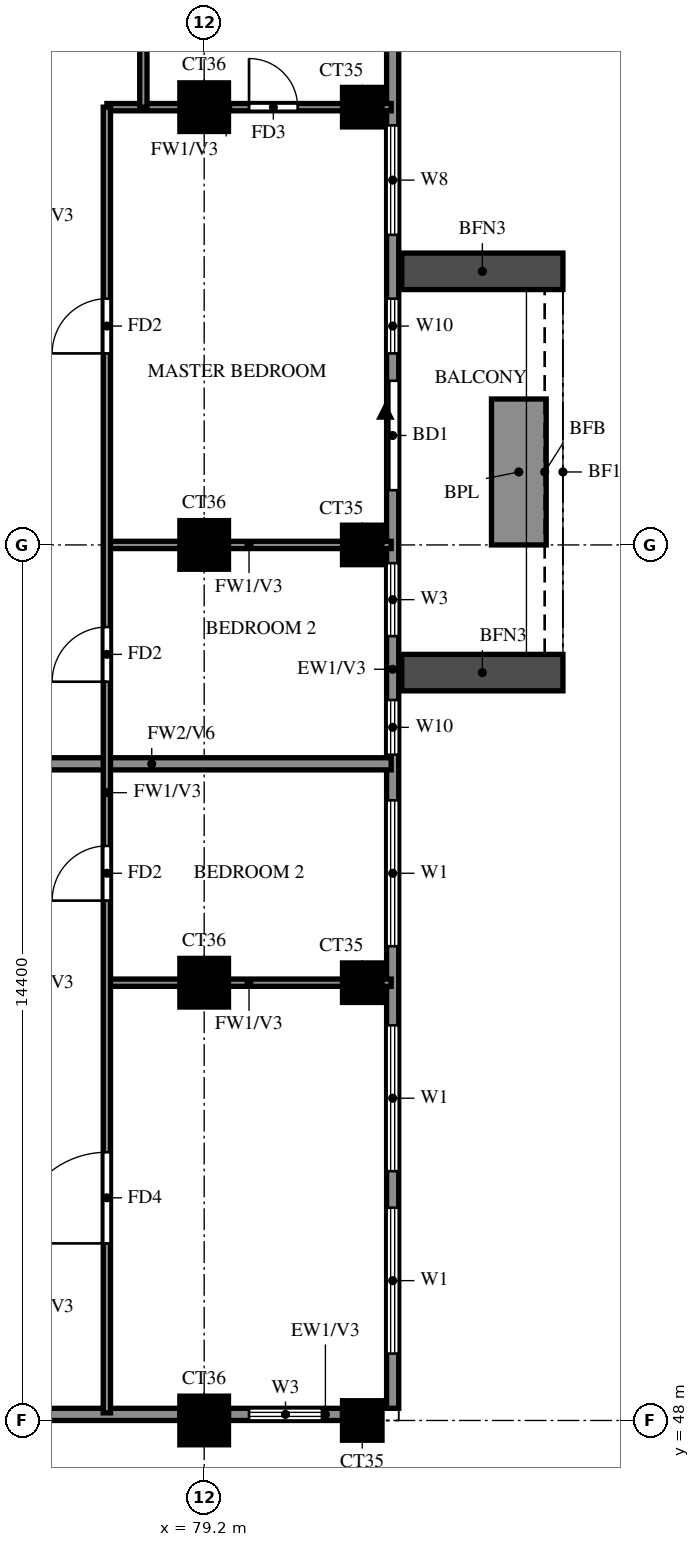
"""IFC4 building model, lengths in metres.
Left out: names, types, materials, properties, quantities, classifications, styles, units other than length and angle.
Written with IfcOpenShell. Run it as: python <this file> out.ifc"""

import sys

from ifc_helpers import new_model, si_unit, direction, frame, frame_2d, origin, origin_2d, place, context, subcontext, project, spatial, rectangle, extrude, source, transform, mapped, element, fill, save


model = new_model("IFC4")
c1 = context("Model", 3, precision=1e-05, world=origin(), true_north=direction((0.0, 1.0)))
c2 = subcontext(c1, "Body", "Model", "MODEL_VIEW")
j1 = project(units=[si_unit("LENGTHUNIT", "METRE"), si_unit("PLANEANGLEUNIT", "RADIAN")], contexts=[c1])
p1 = place(None, origin())
s1 = spatial("IfcSite", under=j1, at=p1, CompositionType="ELEMENT")
p2 = place(p1, origin())
s2 = spatial("IfcBuilding", under=s1, at=p2, CompositionType="ELEMENT")
p3 = place(p2, frame((0.0, 0.0, 246.5)))
s3 = spatial("IfcBuildingStorey", under=s2, at=p3, CompositionType="ELEMENT", Elevation=246.5)
m1 = source(origin(), c2, "Body", "SweptSolid", [
    extrude(rectangle(XDim=0.8, YDim=0.8, at=origin_2d()), origin(), (0.0, 0.0, 1.0), 3.22),
])
p4 = place(p3, frame((79.2, 48.0, 0.0), z_axis=(0.0, 0.0, 1.0), x_axis=(1.0, 0.0, 0.0)))
e1 = element("IfcColumn", 1, at=p4, inside=s3, PredefinedType="COLUMN", context=c2, shape_type="MappedRepresentation", body=[
    mapped(m1, transform((0.0, 0.0, 0.0))),
])
m2 = source(origin(), c2, "Body", "SweptSolid", [
    extrude(rectangle(XDim=0.65, YDim=0.65, at=origin_2d()), origin(), (0.0, 0.0, 1.0), 3.22),
])
p5 = place(p3, frame((81.8, 48.0, 0.0), z_axis=(0.0, 0.0, 1.0), x_axis=(1.0, 0.0, 0.0)))
e2 = element("IfcColumn", 2, at=p5, inside=s3, PredefinedType="COLUMN", context=c2, shape_type="MappedRepresentation", body=[
    mapped(m2, transform((0.0, 0.0, 0.0))),
])
p6 = place(p3, frame((79.2, 55.2, 0.0), z_axis=(0.0, 0.0, 1.0), x_axis=(1.0, 0.0, 0.0)))
e3 = element("IfcColumn", 3, at=p6, inside=s3, PredefinedType="COLUMN", context=c2, shape_type="MappedRepresentation", body=[
    mapped(m1, transform((0.0, 0.0, 0.0))),
])
p7 = place(p3, frame((81.8, 55.2, 0.0), z_axis=(0.0, 0.0, 1.0), x_axis=(1.0, 0.0, 0.0)))
e4 = element("IfcColumn", 4, at=p7, inside=s3, PredefinedType="COLUMN", context=c2, shape_type="MappedRepresentation", body=[
    mapped(m2, transform((0.0, 0.0, 0.0))),
])
p8 = place(p3, frame((79.2, 62.4, 0.0), z_axis=(0.0, 0.0, 1.0), x_axis=(1.0, 0.0, 0.0)))
e5 = element("IfcColumn", 5, at=p8, inside=s3, PredefinedType="COLUMN", context=c2, shape_type="MappedRepresentation", body=[
    mapped(m1, transform((0.0, 0.0, 0.0))),
])
p9 = place(p3, frame((81.8, 62.4, 0.0), z_axis=(0.0, 0.0, 1.0), x_axis=(1.0, 0.0, 0.0)))
e6 = element("IfcColumn", 6, at=p9, inside=s3, PredefinedType="COLUMN", context=c2, shape_type="MappedRepresentation", body=[
    mapped(m2, transform((0.0, 0.0, 0.0))),
])
p10 = place(p3, frame((79.2, 69.6, 0.0), z_axis=(0.0, 0.0, 1.0), x_axis=(1.0, 0.0, 0.0)))
e7 = element("IfcColumn", 7, at=p10, inside=s3, PredefinedType="COLUMN", context=c2, shape_type="MappedRepresentation", body=[
    mapped(m1, transform((0.0, 0.0, 0.0))),
])
p11 = place(p3, frame((81.8, 69.6, 0.0), z_axis=(0.0, 0.0, 1.0), x_axis=(1.0, 0.0, 0.0)))
e8 = element("IfcColumn", 8, at=p11, inside=s3, PredefinedType="COLUMN", context=c2, shape_type="MappedRepresentation", body=[
    mapped(m2, transform((0.0, 0.0, 0.0))),
])
p12 = place(p3, frame((81.907, 39.87, 0.0), z_axis=(0.0, 0.0, 1.0), x_axis=(-0.777936274417, 0.62834318087, 0.0)))
e9 = element("IfcWall", 9, at=p12, inside=s3, PredefinedType="SOLIDWALL", context=c2, shape_type="SweptSolid", body=[
    extrude(rectangle(XDim=13.099, YDim=0.2, at=frame_2d((6.549, 0.0))), origin(), (0.0, 0.0, 1.0), 3.22),
])
p13 = place(p12, frame((9.938, 0.0, 1.5)))
e10 = element("IfcOpeningElement", 10, at=p13, cuts=e9, PredefinedType="OPENING", context=c2, shape_type="SweptSolid", body=[
    extrude(rectangle(XDim=0.9, YDim=0.9, at=frame_2d((0.45, 0.45))), frame((0.0, 0.11, 0.0), z_axis=(0.0, -1.0, 0.0), x_axis=(1.0, 0.0, 0.0)), (0.0, 0.0, 1.0), 0.22),
])
p14 = place(p3, frame((71.987, 48.1, 0.0), z_axis=(0.0, 0.0, 1.0), x_axis=(1.0, 0.0, 0.0)))
e11 = element("IfcWall", 11, at=p14, inside=s3, PredefinedType="SOLIDWALL", context=c2, shape_type="SweptSolid", body=[
    extrude(rectangle(XDim=6.813, YDim=0.2, at=frame_2d((3.406, 0.0))), origin(), (0.0, 0.0, 1.0), 3.22),
])
p15 = place(p3, frame((79.6, 48.1, 0.0), z_axis=(0.0, 0.0, 1.0), x_axis=(1.0, 0.0, 0.0)))
e12 = element("IfcWall", 12, at=p15, inside=s3, PredefinedType="SOLIDWALL", context=c2, shape_type="SweptSolid", body=[
    extrude(rectangle(XDim=1.875, YDim=0.2, at=frame_2d((0.938, 0.0))), origin(), (0.0, 0.0, 1.0), 3.22),
])
p16 = place(p15, frame((0.337, 0.0, 0.6)))
e13 = element("IfcOpeningElement", 13, at=p16, cuts=e12, PredefinedType="OPENING", context=c2, shape_type="SweptSolid", body=[
    extrude(rectangle(XDim=1.2, YDim=2.4, at=frame_2d((0.6, 1.2))), frame((0.0, 0.11, 0.0), z_axis=(0.0, -1.0, 0.0), x_axis=(1.0, 0.0, 0.0)), (0.0, 0.0, 1.0), 0.22),
])
p17 = place(p3, frame((82.3, 48.2, 0.0), z_axis=(0.0, 0.0, 1.0), x_axis=(0.0, 1.0, 0.0)))
e14 = element("IfcWall", 14, at=p17, inside=s3, PredefinedType="SOLIDWALL", context=c2, shape_type="SweptSolid", body=[
    extrude(rectangle(XDim=28.6, YDim=0.2, at=frame_2d((14.3, 0.0))), origin(), (0.0, 0.0, 1.0), 3.22),
])
p18 = place(p17, frame((15.1, 0.0, 0.0)))
e15 = element("IfcOpeningElement", 15, at=p18, cuts=e14, PredefinedType="OPENING", context=c2, shape_type="SweptSolid", body=[
    extrude(rectangle(XDim=1.8, YDim=2.4, at=frame_2d((0.9, 1.2))), frame((0.0, 0.11, 0.0), z_axis=(0.0, -1.0, 0.0), x_axis=(1.0, 0.0, 0.0)), (0.0, 0.0, 1.0), 0.22),
])
p19 = place(p17, frame((0.9, 0.0, 0.6)))
e16 = element("IfcOpeningElement", 16, at=p19, cuts=e14, PredefinedType="OPENING", context=c2, shape_type="SweptSolid", body=[
    extrude(rectangle(XDim=2.4, YDim=2.4, at=frame_2d((1.2, 1.2))), frame((0.0, 0.11, 0.0), z_axis=(0.0, -1.0, 0.0), x_axis=(1.0, 0.0, 0.0)), (0.0, 0.0, 1.0), 0.22),
])
p20 = place(p17, frame((3.9, 0.0, 0.6)))
e17 = element("IfcOpeningElement", 17, at=p20, cuts=e14, PredefinedType="OPENING", context=c2, shape_type="SweptSolid", body=[
    extrude(rectangle(XDim=2.4, YDim=2.4, at=frame_2d((1.2, 1.2))), frame((0.0, 0.11, 0.0), z_axis=(0.0, -1.0, 0.0), x_axis=(1.0, 0.0, 0.0)), (0.0, 0.0, 1.0), 0.22),
])
p21 = place(p17, frame((7.6, 0.0, 0.6)))
e18 = element("IfcOpeningElement", 18, at=p21, cuts=e14, PredefinedType="OPENING", context=c2, shape_type="SweptSolid", body=[
    extrude(rectangle(XDim=2.4, YDim=2.4, at=frame_2d((1.2, 1.2))), frame((0.0, 0.11, 0.0), z_axis=(0.0, -1.0, 0.0), x_axis=(1.0, 0.0, 0.0)), (0.0, 0.0, 1.0), 0.22),
])
p22 = place(p17, frame((10.75, 0.0, 0.6)))
e19 = element("IfcOpeningElement", 19, at=p22, cuts=e14, PredefinedType="OPENING", context=c2, shape_type="SweptSolid", body=[
    extrude(rectangle(XDim=0.9, YDim=2.4, at=frame_2d((0.45, 1.2))), frame((0.0, 0.11, 0.0), z_axis=(0.0, -1.0, 0.0), x_axis=(1.0, 0.0, 0.0)), (0.0, 0.0, 1.0), 0.22),
])
p23 = place(p17, frame((12.7, 0.0, 0.6)))
e20 = element("IfcOpeningElement", 20, at=p23, cuts=e14, PredefinedType="OPENING", context=c2, shape_type="SweptSolid", body=[
    extrude(rectangle(XDim=1.2, YDim=2.4, at=frame_2d((0.6, 1.2))), frame((0.0, 0.11, 0.0), z_axis=(0.0, -1.0, 0.0), x_axis=(1.0, 0.0, 0.0)), (0.0, 0.0, 1.0), 0.22),
])
p24 = place(p17, frame((17.35, 0.0, 0.6)))
e21 = element("IfcOpeningElement", 21, at=p24, cuts=e14, PredefinedType="OPENING", context=c2, shape_type="SweptSolid", body=[
    extrude(rectangle(XDim=0.9, YDim=2.4, at=frame_2d((0.45, 1.2))), frame((0.0, 0.11, 0.0), z_axis=(0.0, -1.0, 0.0), x_axis=(1.0, 0.0, 0.0)), (0.0, 0.0, 1.0), 0.22),
])
p25 = place(p17, frame((19.3, 0.0, 0.6)))
e22 = element("IfcOpeningElement", 22, at=p25, cuts=e14, PredefinedType="OPENING", context=c2, shape_type="SweptSolid", body=[
    extrude(rectangle(XDim=1.8, YDim=2.4, at=frame_2d((0.9, 1.2))), frame((0.0, 0.11, 0.0), z_axis=(0.0, -1.0, 0.0), x_axis=(1.0, 0.0, 0.0)), (0.0, 0.0, 1.0), 0.22),
])
p26 = place(p17, frame((22.75, 0.0, 1.5)))
e23 = element("IfcOpeningElement", 23, at=p26, cuts=e14, PredefinedType="OPENING", context=c2, shape_type="SweptSolid", body=[
    extrude(rectangle(XDim=0.9, YDim=0.9, at=frame_2d((0.45, 0.45))), frame((0.0, 0.11, 0.0), z_axis=(0.0, -1.0, 0.0), x_axis=(1.0, 0.0, 0.0)), (0.0, 0.0, 1.0), 0.22),
])
p27 = place(p17, frame((25.5, 0.0, 0.6)))
e24 = element("IfcOpeningElement", 24, at=p27, cuts=e14, PredefinedType="OPENING", context=c2, shape_type="SweptSolid", body=[
    extrude(rectangle(XDim=2.4, YDim=2.4, at=frame_2d((1.2, 1.2))), frame((0.0, 0.11, 0.0), z_axis=(0.0, -1.0, 0.0), x_axis=(1.0, 0.0, 0.0)), (0.0, 0.0, 1.0), 0.22),
])
for number, where, z_axis, x_axis in (
    (25, (82.45, 60.3, 0.0), (0.0, 0.0, 1.0), (1.0, 0.0, 0.0)),
    (26, (82.45, 66.9, 0.0), (0.0, 0.0, 1.0), (1.0, 0.0, 0.0)),
):
    element("IfcWall", number, at=place(p3, frame(where, z_axis=z_axis, x_axis=x_axis)), inside=s3, PredefinedType="SOLIDWALL", context=c2, shape_type="SweptSolid", body=[
        extrude(rectangle(XDim=2.65, YDim=0.6, at=frame_2d((1.325, 0.0))), origin(), (0.0, 0.0, 1.0), 2.85),
    ])
p28 = place(p3, frame((84.375, 62.4, 0.0), z_axis=(0.0, 0.0, 1.0), x_axis=(0.0, 1.0, 0.0)))
e27 = element("IfcWall", 27, at=p28, inside=s3, PredefinedType="SOLIDWALL", context=c2, shape_type="SweptSolid", body=[
    extrude(rectangle(XDim=2.4, YDim=0.9, at=frame_2d((1.2, 0.0))), origin(), (0.0, 0.0, 1.0), 0.9),
])
p29 = place(p3, frame((74.4, 58.8, 0.0), z_axis=(0.0, 0.0, 1.0), x_axis=(1.0, 0.0, 0.0)))
e28 = element("IfcWall", 28, at=p29, inside=s3, PredefinedType="SOLIDWALL", context=c2, shape_type="SweptSolid", body=[
    extrude(rectangle(XDim=7.875, YDim=0.2, at=frame_2d((3.938, 0.0))), origin(), (0.0, 0.0, 1.0), 2.32),
])
for number, where, z_axis, x_axis in (
    (29, (77.6, 55.2, 0.0), (0.0, 0.0, 1.0), (1.0, 0.0, 0.0)),
    (30, (77.6, 62.4, 0.0), (0.0, 0.0, 1.0), (1.0, 0.0, 0.0)),
):
    element("IfcWall", number, at=place(p3, frame(where, z_axis=z_axis, x_axis=x_axis)), inside=s3, PredefinedType="PARTITIONING", context=c2, shape_type="SweptSolid", body=[
        extrude(rectangle(XDim=4.675, YDim=0.12, at=frame_2d((2.337, 0.0))), origin(), (0.0, 0.0, 1.0), 3.22),
    ])
p30 = place(p3, frame((77.6, 69.6, 0.0), z_axis=(0.0, 0.0, 1.0), x_axis=(1.0, 0.0, 0.0)))
e31 = element("IfcWall", 31, at=p30, inside=s3, PredefinedType="PARTITIONING", context=c2, shape_type="SweptSolid", body=[
    extrude(rectangle(XDim=4.675, YDim=0.12, at=frame_2d((2.337, 0.0))), origin(), (0.0, 0.0, 1.0), 3.22),
])
p31 = place(p30, frame((2.337, 0.0, 0.0)))
e32 = element("IfcOpeningElement", 32, at=p31, cuts=e31, PredefinedType="OPENING", context=c2, shape_type="SweptSolid", body=[
    extrude(rectangle(XDim=0.8, YDim=2.1, at=frame_2d((0.4, 1.05))), frame((0.0, 0.07, 0.0), z_axis=(0.0, -1.0, 0.0), x_axis=(1.0, 0.0, 0.0)), (0.0, 0.0, 1.0), 0.14),
])
p32 = place(p3, frame((77.6, 48.125, 0.0), z_axis=(0.0, 0.0, 1.0), x_axis=(0.0, 1.0, 0.0)))
e33 = element("IfcWall", 33, at=p32, inside=s3, PredefinedType="PARTITIONING", context=c2, shape_type="SweptSolid", body=[
    extrude(rectangle(XDim=21.475, YDim=0.12, at=frame_2d((10.738, 0.0))), origin(), (0.0, 0.0, 1.0), 3.22),
])
p33 = place(p32, frame((2.788, 0.0, 0.0)))
e34 = element("IfcOpeningElement", 34, at=p33, cuts=e33, PredefinedType="OPENING", context=c2, shape_type="SweptSolid", body=[
    extrude(rectangle(XDim=1.5, YDim=2.1, at=frame_2d((0.75, 1.05))), frame((0.0, 0.07, 0.0), z_axis=(0.0, -1.0, 0.0), x_axis=(1.0, 0.0, 0.0)), (0.0, 0.0, 1.0), 0.14),
])
p34 = place(p32, frame((8.425, 0.0, 0.0)))
e35 = element("IfcOpeningElement", 35, at=p34, cuts=e33, PredefinedType="OPENING", context=c2, shape_type="SweptSolid", body=[
    extrude(rectangle(XDim=0.9, YDim=2.1, at=frame_2d((0.45, 1.05))), frame((0.0, 0.07, 0.0), z_axis=(0.0, -1.0, 0.0), x_axis=(1.0, 0.0, 0.0)), (0.0, 0.0, 1.0), 0.14),
])
p35 = place(p32, frame((12.025, 0.0, 0.0)))
e36 = element("IfcOpeningElement", 36, at=p35, cuts=e33, PredefinedType="OPENING", context=c2, shape_type="SweptSolid", body=[
    extrude(rectangle(XDim=0.9, YDim=2.1, at=frame_2d((0.45, 1.05))), frame((0.0, 0.07, 0.0), z_axis=(0.0, -1.0, 0.0), x_axis=(1.0, 0.0, 0.0)), (0.0, 0.0, 1.0), 0.14),
])
p36 = place(p32, frame((17.425, 0.0, 0.0)))
e37 = element("IfcOpeningElement", 37, at=p36, cuts=e33, PredefinedType="OPENING", context=c2, shape_type="SweptSolid", body=[
    extrude(rectangle(XDim=0.9, YDim=2.1, at=frame_2d((0.45, 1.05))), frame((0.0, 0.07, 0.0), z_axis=(0.0, -1.0, 0.0), x_axis=(1.0, 0.0, 0.0)), (0.0, 0.0, 1.0), 0.14),
])
p37 = place(p3, frame((78.2, 69.6, 0.0), z_axis=(0.0, 0.0, 1.0), x_axis=(0.0, 1.0, 0.0)))
e38 = element("IfcWall", 38, at=p37, inside=s3, PredefinedType="PARTITIONING", context=c2, shape_type="SweptSolid", body=[
    extrude(rectangle(XDim=3.6, YDim=0.12, at=frame_2d((1.8, 0.0))), origin(), (0.0, 0.0, 1.0), 3.22),
])
p38 = place(p16, origin())
e39 = element("IfcWindow", 39, at=p38, inside=s3, PartitioningType="SINGLE_PANEL", PredefinedType="WINDOW", context=c2, shape_type="SweptSolid", body=[
    extrude(rectangle(XDim=1.2, YDim=2.4, at=frame_2d((0.6, 1.2))), frame((0.0, 0.03, 0.0), z_axis=(0.0, -1.0, 0.0), x_axis=(1.0, 0.0, 0.0)), (0.0, 0.0, 1.0), 0.06),
])
fill(e13, e39)
p39 = place(p18, origin())
e40 = element("IfcDoor", 40, at=p39, inside=s3, OperationType="DOUBLE_DOOR_SLIDING", PredefinedType="DOOR", context=c2, shape_type="SweptSolid", body=[
    extrude(rectangle(XDim=1.8, YDim=2.4, at=frame_2d((0.9, 1.2))), frame((0.0, 0.025, 0.0), z_axis=(0.0, -1.0, 0.0), x_axis=(1.0, 0.0, 0.0)), (0.0, 0.0, 1.0), 0.05),
])
fill(e15, e40)
p40 = place(p19, origin())
e41 = element("IfcWindow", 41, at=p40, inside=s3, PartitioningType="DOUBLE_PANEL_VERTICAL", PredefinedType="WINDOW", context=c2, shape_type="SweptSolid", body=[
    extrude(rectangle(XDim=2.4, YDim=2.4, at=frame_2d((1.2, 1.2))), frame((0.0, 0.03, 0.0), z_axis=(0.0, -1.0, 0.0), x_axis=(1.0, 0.0, 0.0)), (0.0, 0.0, 1.0), 0.06),
])
fill(e16, e41)
p41 = place(p20, origin())
e42 = element("IfcWindow", 42, at=p41, inside=s3, PartitioningType="DOUBLE_PANEL_VERTICAL", PredefinedType="WINDOW", context=c2, shape_type="SweptSolid", body=[
    extrude(rectangle(XDim=2.4, YDim=2.4, at=frame_2d((1.2, 1.2))), frame((0.0, 0.03, 0.0), z_axis=(0.0, -1.0, 0.0), x_axis=(1.0, 0.0, 0.0)), (0.0, 0.0, 1.0), 0.06),
])
fill(e17, e42)
p42 = place(p21, origin())
e43 = element("IfcWindow", 43, at=p42, inside=s3, PartitioningType="DOUBLE_PANEL_VERTICAL", PredefinedType="WINDOW", context=c2, shape_type="SweptSolid", body=[
    extrude(rectangle(XDim=2.4, YDim=2.4, at=frame_2d((1.2, 1.2))), frame((0.0, 0.03, 0.0), z_axis=(0.0, -1.0, 0.0), x_axis=(1.0, 0.0, 0.0)), (0.0, 0.0, 1.0), 0.06),
])
fill(e18, e43)
p43 = place(p22, origin())
e44 = element("IfcWindow", 44, at=p43, inside=s3, PartitioningType="SINGLE_PANEL", PredefinedType="WINDOW", context=c2, shape_type="SweptSolid", body=[
    extrude(rectangle(XDim=0.9, YDim=2.4, at=frame_2d((0.45, 1.2))), frame((0.0, 0.03, 0.0), z_axis=(0.0, -1.0, 0.0), x_axis=(1.0, 0.0, 0.0)), (0.0, 0.0, 1.0), 0.06),
])
fill(e19, e44)
p44 = place(p23, origin())
e45 = element("IfcWindow", 45, at=p44, inside=s3, PartitioningType="SINGLE_PANEL", PredefinedType="WINDOW", context=c2, shape_type="SweptSolid", body=[
    extrude(rectangle(XDim=1.2, YDim=2.4, at=frame_2d((0.6, 1.2))), frame((0.0, 0.03, 0.0), z_axis=(0.0, -1.0, 0.0), x_axis=(1.0, 0.0, 0.0)), (0.0, 0.0, 1.0), 0.06),
])
fill(e20, e45)
p45 = place(p24, origin())
e46 = element("IfcWindow", 46, at=p45, inside=s3, PartitioningType="SINGLE_PANEL", PredefinedType="WINDOW", context=c2, shape_type="SweptSolid", body=[
    extrude(rectangle(XDim=0.9, YDim=2.4, at=frame_2d((0.45, 1.2))), frame((0.0, 0.03, 0.0), z_axis=(0.0, -1.0, 0.0), x_axis=(1.0, 0.0, 0.0)), (0.0, 0.0, 1.0), 0.06),
])
fill(e21, e46)
p46 = place(p25, origin())
e47 = element("IfcWindow", 47, at=p46, inside=s3, PartitioningType="DOUBLE_PANEL_VERTICAL", PredefinedType="WINDOW", context=c2, shape_type="SweptSolid", body=[
    extrude(rectangle(XDim=1.8, YDim=2.4, at=frame_2d((0.9, 1.2))), frame((0.0, 0.03, 0.0), z_axis=(0.0, -1.0, 0.0), x_axis=(1.0, 0.0, 0.0)), (0.0, 0.0, 1.0), 0.06),
])
fill(e22, e47)
p47 = place(p33, origin())
e48 = element("IfcDoor", 48, at=p47, inside=s3, OperationType="SINGLE_SWING_LEFT", PredefinedType="DOOR", context=c2, shape_type="SweptSolid", body=[
    extrude(rectangle(XDim=1.5, YDim=2.1, at=frame_2d((0.75, 1.05))), frame((0.0, 0.025, 0.0), z_axis=(0.0, -1.0, 0.0), x_axis=(1.0, 0.0, 0.0)), (0.0, 0.0, 1.0), 0.05),
])
fill(e34, e48)
p48 = place(p34, origin())
e49 = element("IfcDoor", 49, at=p48, inside=s3, OperationType="SINGLE_SWING_RIGHT", PredefinedType="DOOR", context=c2, shape_type="SweptSolid", body=[
    extrude(rectangle(XDim=0.9, YDim=2.1, at=frame_2d((0.45, 1.05))), frame((0.0, 0.025, 0.0), z_axis=(0.0, -1.0, 0.0), x_axis=(1.0, 0.0, 0.0)), (0.0, 0.0, 1.0), 0.05),
])
fill(e35, e49)
p49 = place(p35, origin())
e50 = element("IfcDoor", 50, at=p49, inside=s3, OperationType="SINGLE_SWING_LEFT", PredefinedType="DOOR", context=c2, shape_type="SweptSolid", body=[
    extrude(rectangle(XDim=0.9, YDim=2.1, at=frame_2d((0.45, 1.05))), frame((0.0, 0.025, 0.0), z_axis=(0.0, -1.0, 0.0), x_axis=(1.0, 0.0, 0.0)), (0.0, 0.0, 1.0), 0.05),
])
fill(e36, e50)
p50 = place(p36, origin())
e51 = element("IfcDoor", 51, at=p50, inside=s3, OperationType="SINGLE_SWING_RIGHT", PredefinedType="DOOR", context=c2, shape_type="SweptSolid", body=[
    extrude(rectangle(XDim=0.9, YDim=2.1, at=frame_2d((0.45, 1.05))), frame((0.0, 0.025, 0.0), z_axis=(0.0, -1.0, 0.0), x_axis=(1.0, 0.0, 0.0)), (0.0, 0.0, 1.0), 0.05),
])
fill(e37, e51)
p51 = place(p31, origin())
e52 = element("IfcDoor", 52, at=p51, inside=s3, OperationType="SINGLE_SWING_RIGHT", PredefinedType="DOOR", context=c2, shape_type="SweptSolid", body=[
    extrude(rectangle(XDim=0.8, YDim=2.1, at=frame_2d((0.4, 1.05))), frame((0.0, 0.025, 0.0), z_axis=(0.0, -1.0, 0.0), x_axis=(1.0, 0.0, 0.0)), (0.0, 0.0, 1.0), 0.05),
])
fill(e32, e52)
save(model, sys.argv[1])
